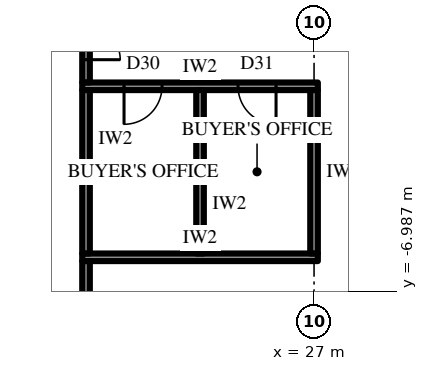
"""IFC4 building model, lengths in metres.
Left out: names, types, materials, properties, quantities, classifications, styles, units other than length and angle.
Written with IfcOpenShell. Run it as: python <this file> out.ifc"""

import sys

from ifc_helpers import new_model, si_unit, direction, frame, frame_2d, origin, place, context, subcontext, project, spatial, rectangle, extrude, element, fill, save


model = new_model("IFC4")
c1 = context("Model", 3, precision=1e-05, world=origin(), true_north=direction((0.0, 1.0)))
c2 = subcontext(c1, "Body", "Model", "MODEL_VIEW")
j1 = project(units=[si_unit("LENGTHUNIT", "METRE"), si_unit("PLANEANGLEUNIT", "RADIAN")], contexts=[c1])
p1 = place(None, origin())
s1 = spatial("IfcSite", under=j1, at=p1, CompositionType="ELEMENT")
p2 = place(p1, origin())
s2 = spatial("IfcBuilding", under=s1, at=p2, CompositionType="ELEMENT")
p3 = place(p2, frame((0.0, 0.0, 69.7)))
s3 = spatial("IfcBuildingStorey", under=s2, at=p3, CompositionType="ELEMENT", Elevation=69.7)
p4 = place(p3, frame((21.232, -30.925, 0.0), z_axis=(0.0, 0.0, 1.0), x_axis=(0.499999163675, 0.866025886636, 0.0)))
e1 = element("IfcWall", 1, at=p4, inside=s3, PredefinedType="SOLIDWALL", context=c2, shape_type="SweptSolid", body=[
    extrude(rectangle(XDim=32.332, YDim=0.3, at=frame_2d((16.166, 0.0))), origin(), (0.0, 0.0, 1.0), 2.7),
])
p5 = place(p4, frame((1.319, 0.0, 0.6)))
e2 = element("IfcOpeningElement", 2, at=p5, cuts=e1, PredefinedType="OPENING", context=c2, shape_type="SweptSolid", body=[
    extrude(rectangle(XDim=2.75, YDim=1.85, at=frame_2d((1.375, 0.925))), frame((0.0, 0.16, 0.0), z_axis=(0.0, -1.0, 0.0), x_axis=(1.0, 0.0, 0.0)), (0.0, 0.0, 1.0), 0.32),
])
p6 = place(p4, frame((6.708, 0.0, 0.6)))
e3 = element("IfcOpeningElement", 3, at=p6, cuts=e1, PredefinedType="OPENING", context=c2, shape_type="SweptSolid", body=[
    extrude(rectangle(XDim=2.75, YDim=1.85, at=frame_2d((1.375, 0.925))), frame((0.0, 0.16, 0.0), z_axis=(0.0, -1.0, 0.0), x_axis=(1.0, 0.0, 0.0)), (0.0, 0.0, 1.0), 0.32),
])
p7 = place(p4, frame((12.872, 0.0, 0.0)))
e4 = element("IfcOpeningElement", 4, at=p7, cuts=e1, PredefinedType="OPENING", context=c2, shape_type="SweptSolid", body=[
    extrude(rectangle(XDim=1.2, YDim=2.4, at=frame_2d((0.6, 1.2))), frame((0.0, 0.16, 0.0), z_axis=(0.0, -1.0, 0.0), x_axis=(1.0, 0.0, 0.0)), (0.0, 0.0, 1.0), 0.32),
])
p8 = place(p4, frame((17.485, 0.0, 0.6)))
e5 = element("IfcOpeningElement", 5, at=p8, cuts=e1, PredefinedType="OPENING", context=c2, shape_type="SweptSolid", body=[
    extrude(rectangle(XDim=2.75, YDim=1.85, at=frame_2d((1.375, 0.925))), frame((0.0, 0.16, 0.0), z_axis=(0.0, -1.0, 0.0), x_axis=(1.0, 0.0, 0.0)), (0.0, 0.0, 1.0), 0.32),
])
p9 = place(p4, frame((22.874, 0.0, 0.6)))
e6 = element("IfcOpeningElement", 6, at=p9, cuts=e1, PredefinedType="OPENING", context=c2, shape_type="SweptSolid", body=[
    extrude(rectangle(XDim=2.75, YDim=1.85, at=frame_2d((1.375, 0.925))), frame((0.0, 0.16, 0.0), z_axis=(0.0, -1.0, 0.0), x_axis=(1.0, 0.0, 0.0)), (0.0, 0.0, 1.0), 0.32),
])
p10 = place(p4, frame((28.262, 0.0, 0.6)))
e7 = element("IfcOpeningElement", 7, at=p10, cuts=e1, PredefinedType="OPENING", context=c2, shape_type="SweptSolid", body=[
    extrude(rectangle(XDim=2.75, YDim=1.85, at=frame_2d((1.375, 0.925))), frame((0.0, 0.16, 0.0), z_axis=(0.0, -1.0, 0.0), x_axis=(1.0, 0.0, 0.0)), (0.0, 0.0, 1.0), 0.32),
])
p11 = place(p3, frame((20.9, -1.6, 0.0), z_axis=(0.0, 0.0, 1.0), x_axis=(1.0, 0.0, 0.0)))
e8 = element("IfcWall", 8, at=p11, inside=s3, PredefinedType="PARTITIONING", context=c2, shape_type="SweptSolid", body=[
    extrude(rectangle(XDim=6.2, YDim=0.2, at=frame_2d((3.1, 0.0))), origin(), (0.0, 0.0, 1.0), 4.0),
])
p12 = place(p11, frame((1.1, 0.0, 0.0)))
e9 = element("IfcOpeningElement", 9, at=p12, cuts=e8, PredefinedType="OPENING", context=c2, shape_type="SweptSolid", body=[
    extrude(rectangle(XDim=1.0, YDim=2.2, at=frame_2d((0.5, 1.1))), frame((0.0, 0.11, 0.0), z_axis=(0.0, -1.0, 0.0), x_axis=(1.0, 0.0, 0.0)), (0.0, 0.0, 1.0), 0.22),
])
p13 = place(p11, frame((4.1, 0.0, 0.0)))
e10 = element("IfcOpeningElement", 10, at=p13, cuts=e8, PredefinedType="OPENING", context=c2, shape_type="SweptSolid", body=[
    extrude(rectangle(XDim=1.0, YDim=2.2, at=frame_2d((0.5, 1.1))), frame((0.0, 0.11, 0.0), z_axis=(0.0, -1.0, 0.0), x_axis=(1.0, 0.0, 0.0)), (0.0, 0.0, 1.0), 0.22),
])
p14 = place(p3, frame((20.9, -6.1, 0.0), z_axis=(0.0, 0.0, 1.0), x_axis=(1.0, 0.0, 0.0)))
e11 = element("IfcWall", 11, at=p14, inside=s3, PredefinedType="PARTITIONING", context=c2, shape_type="SweptSolid", body=[
    extrude(rectangle(XDim=6.2, YDim=0.2, at=frame_2d((3.1, 0.0))), origin(), (0.0, 0.0, 1.0), 4.0),
])
for number, where, z_axis, x_axis in (
    (12, (21.0, -1.7, 0.0), (0.0, 0.0, 1.0), (0.0, -1.0, 0.0)),
    (13, (24.0, -1.7, 0.0), (0.0, 0.0, 1.0), (0.0, -1.0, 0.0)),
    (14, (27.0, -1.7, 0.0), (0.0, 0.0, 1.0), (0.0, -1.0, 0.0)),
):
    element("IfcWall", number, at=place(p3, frame(where, z_axis=z_axis, x_axis=x_axis)), inside=s3, PredefinedType="PARTITIONING", context=c2, shape_type="SweptSolid", body=[
        extrude(rectangle(XDim=4.3, YDim=0.2, at=frame_2d((2.15, 0.0))), origin(), (0.0, 0.0, 1.0), 4.0),
    ])
p15 = place(p3, frame((21.0, -6.201, 0.0), z_axis=(0.0, 0.0, 1.0), x_axis=(0.0, -1.0, 0.0)))
e15 = element("IfcWall", 15, at=p15, inside=s3, PredefinedType="PARTITIONING", context=c2, shape_type="SweptSolid", body=[
    extrude(rectangle(XDim=6.499, YDim=0.2, at=frame_2d((3.25, 0.0))), origin(), (0.0, 0.0, 1.0), 4.0),
])
p16 = place(p3, frame((21.0, 1.499, 0.0), z_axis=(0.0, 0.0, 1.0), x_axis=(0.0, -1.0, 0.0)))
e16 = element("IfcWall", 16, at=p16, inside=s3, PredefinedType="PARTITIONING", context=c2, shape_type="SweptSolid", body=[
    extrude(rectangle(XDim=2.998, YDim=0.2, at=frame_2d((1.499, 0.0))), origin(), (0.0, 0.0, 1.0), 4.0),
])
p17 = place(p16, frame((0.599, 0.0, 0.0)))
e17 = element("IfcOpeningElement", 17, at=p17, cuts=e16, PredefinedType="OPENING", context=c2, shape_type="SweptSolid", body=[
    extrude(rectangle(XDim=1.8, YDim=2.4, at=frame_2d((0.9, 1.2))), frame((0.0, 0.11, 0.0), z_axis=(0.0, -1.0, 0.0), x_axis=(1.0, 0.0, 0.0)), (0.0, 0.0, 1.0), 0.22),
])
p18 = place(p12, frame((1.0, 0.0, 0.0), z_axis=(0.0, 0.0, 1.0), x_axis=(-1.0, 0.0, 0.0)))
e18 = element("IfcDoor", 18, at=p18, inside=s3, OperationType="SINGLE_SWING_LEFT", PredefinedType="DOOR", context=c2, shape_type="SweptSolid", body=[
    extrude(rectangle(XDim=1.0, YDim=2.2, at=frame_2d((0.5, 1.1))), frame((0.0, 0.025, 0.0), z_axis=(0.0, -1.0, 0.0), x_axis=(1.0, 0.0, 0.0)), (0.0, 0.0, 1.0), 0.05),
])
fill(e9, e18)
p19 = place(p13, frame((1.0, 0.0, 0.0), z_axis=(0.0, 0.0, 1.0), x_axis=(-1.0, 0.0, 0.0)))
e19 = element("IfcDoor", 19, at=p19, inside=s3, OperationType="SINGLE_SWING_RIGHT", PredefinedType="DOOR", context=c2, shape_type="SweptSolid", body=[
    extrude(rectangle(XDim=1.0, YDim=2.2, at=frame_2d((0.5, 1.1))), frame((0.0, 0.025, 0.0), z_axis=(0.0, -1.0, 0.0), x_axis=(1.0, 0.0, 0.0)), (0.0, 0.0, 1.0), 0.05),
])
fill(e10, e19)
p20 = place(p17, origin())
e20 = element("IfcDoor", 20, at=p20, inside=s3, OperationType="DOUBLE_DOOR_SINGLE_SWING", PredefinedType="DOOR", context=c2, shape_type="SweptSolid", body=[
    extrude(rectangle(XDim=1.8, YDim=2.4, at=frame_2d((0.9, 1.2))), frame((0.0, 0.025, 0.0), z_axis=(0.0, -1.0, 0.0), x_axis=(1.0, 0.0, 0.0)), (0.0, 0.0, 1.0), 0.05),
])
fill(e17, e20)
save(model, sys.argv[1])
